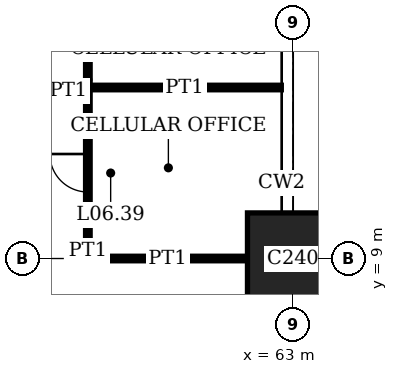
"""IFC4 building model, lengths in metres.
Left out: names, types, materials, properties, quantities, classifications, styles, units other than length and angle.
Written with IfcOpenShell. Run it as: python <this file> out.ifc"""

import sys

from ifc_helpers import new_model, si_unit, direction, frame, frame_2d, origin, origin_2d, place, context, subcontext, project, spatial, rectangle, extrude, element, fill, save


model = new_model("IFC4")
c1 = context("Model", 3, precision=1e-05, world=origin(), true_north=direction((0.0, 1.0)))
c2 = subcontext(c1, "Body", "Model", "MODEL_VIEW")
j1 = project(units=[si_unit("LENGTHUNIT", "METRE"), si_unit("PLANEANGLEUNIT", "RADIAN")], contexts=[c1])
p1 = place(None, origin())
s1 = spatial("IfcSite", under=j1, at=p1, CompositionType="ELEMENT")
p2 = place(p1, origin())
s2 = spatial("IfcBuilding", under=s1, at=p2, CompositionType="ELEMENT")
p3 = place(p2, frame((0.0, 0.0, 27.8)))
s3 = spatial("IfcBuildingStorey", under=s2, at=p3, CompositionType="ELEMENT", Elevation=27.8)
p4 = place(p3, frame((63.0, 9.0, 0.0), z_axis=(0.0, 0.0, 1.0), x_axis=(1.0, 0.0, 0.0)))
e1 = element("IfcColumn", 1, at=p4, inside=s3, PredefinedType="COLUMN", context=c2, shape_type="SweptSolid", body=[
    extrude(rectangle(XDim=2.4, YDim=2.4, at=origin_2d()), origin(), (0.0, 0.0, 1.0), 4.0),
])
p5 = place(p3, frame((57.6, 9.0, 0.0), z_axis=(0.0, 0.0, 1.0), x_axis=(1.0, 0.0, 0.0)))
e2 = element("IfcWall", 2, at=p5, inside=s3, PredefinedType="PARTITIONING", context=c2, shape_type="SweptSolid", body=[
    extrude(rectangle(XDim=4.2, YDim=0.12, at=frame_2d((2.1, 0.0))), origin(), (0.0, 0.0, 1.0), 3.05),
])
p6 = place(p3, frame((57.6, 13.5, 0.0), z_axis=(0.0, 0.0, 1.0), x_axis=(1.0, 0.0, 0.0)))
e3 = element("IfcWall", 3, at=p6, inside=s3, PredefinedType="PARTITIONING", context=c2, shape_type="SweptSolid", body=[
    extrude(rectangle(XDim=5.09, YDim=0.12, at=frame_2d((2.545, 0.0))), origin(), (0.0, 0.0, 1.0), 3.1),
])
p7 = place(p3, frame((57.6, 9.0, 0.0), z_axis=(0.0, 0.0, 1.0), x_axis=(0.0, 1.0, 0.0)))
e4 = element("IfcWall", 4, at=p7, inside=s3, PredefinedType="PARTITIONING", context=c2, shape_type="SweptSolid", body=[
    extrude(rectangle(XDim=4.5, YDim=0.12, at=frame_2d((2.25, 0.0))), origin(), (0.0, 0.0, 1.0), 3.75),
])
p8 = place(p7, frame((1.75, 0.0, 0.0)))
e5 = element("IfcOpeningElement", 5, at=p8, cuts=e4, PredefinedType="OPENING", context=c2, shape_type="SweptSolid", body=[
    extrude(rectangle(XDim=1.0, YDim=2.4, at=frame_2d((0.5, 1.2))), frame((0.0, 0.07, 0.0), z_axis=(0.0, -1.0, 0.0), x_axis=(1.0, 0.0, 0.0)), (0.0, 0.0, 1.0), 0.14),
])
p9 = place(p3, frame((57.6, 13.5, 0.0), z_axis=(0.0, 0.0, 1.0), x_axis=(0.0, 1.0, 0.0)))
e6 = element("IfcWall", 6, at=p9, inside=s3, PredefinedType="PARTITIONING", context=c2, shape_type="SweptSolid", body=[
    extrude(rectangle(XDim=4.5, YDim=0.12, at=frame_2d((2.25, 0.0))), origin(), (0.0, 0.0, 1.0), 3.75),
])
p10 = place(p9, frame((1.75, 0.0, 0.0)))
e7 = element("IfcOpeningElement", 7, at=p10, cuts=e6, PredefinedType="OPENING", context=c2, shape_type="SweptSolid", body=[
    extrude(rectangle(XDim=1.0, YDim=2.4, at=frame_2d((0.5, 1.2))), frame((0.0, 0.07, 0.0), z_axis=(0.0, -1.0, 0.0), x_axis=(1.0, 0.0, 0.0)), (0.0, 0.0, 1.0), 0.14),
])
p11 = place(p8, origin())
e8 = element("IfcDoor", 8, at=p11, inside=s3, OperationType="SINGLE_SWING_LEFT", PredefinedType="DOOR", context=c2, shape_type="SweptSolid", body=[
    extrude(rectangle(XDim=1.0, YDim=2.4, at=frame_2d((0.5, 1.2))), frame((0.0, 0.025, 0.0), z_axis=(0.0, -1.0, 0.0), x_axis=(1.0, 0.0, 0.0)), (0.0, 0.0, 1.0), 0.05),
])
fill(e5, e8)
save(model, sys.argv[1])
